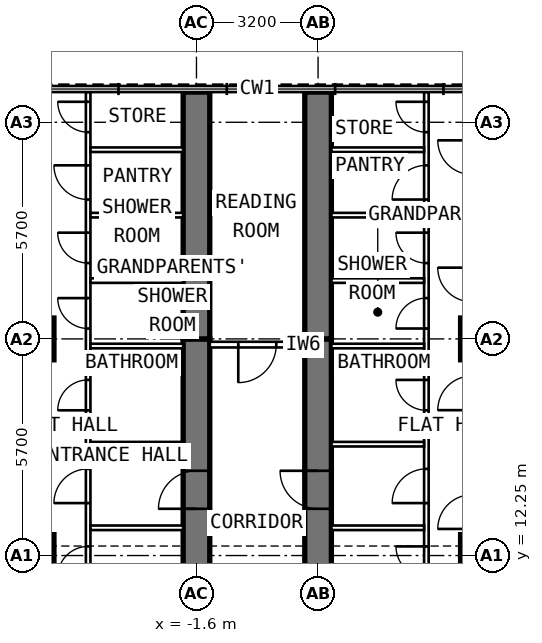
"""IFC4 building model, lengths in metres.
Left out: names, types, materials, properties, quantities, classifications, styles, units other than length and angle.
Written with IfcOpenShell. Run it as: python <this file> out.ifc"""

import sys

from ifc_helpers import new_model, si_unit, direction, frame, frame_2d, origin, origin_2d, place, context, subcontext, project, spatial, rectangle, extrude, element, fill, save


model = new_model("IFC4")
c1 = context("Model", 3, precision=1e-05, world=origin(), true_north=direction((0.0, 1.0)))
c2 = subcontext(c1, "Body", "Model", "MODEL_VIEW")
j1 = project(units=[si_unit("LENGTHUNIT", "METRE"), si_unit("PLANEANGLEUNIT", "RADIAN")], contexts=[c1])
p1 = place(None, origin())
s1 = spatial("IfcSite", under=j1, at=p1, CompositionType="ELEMENT")
p2 = place(p1, origin())
s2 = spatial("IfcBuilding", under=s1, at=p2, CompositionType="ELEMENT")
p3 = place(p2, frame((0.0, 0.0, 208.2)))
s3 = spatial("IfcBuildingStorey", under=s2, at=p3, CompositionType="ELEMENT", Elevation=208.2)
for number, where, z_axis, x_axis in (
    (1, (-5.9, 12.25, 0.0), (0.0, 0.0, 1.0), (0.0, 1.0, 0.0)),
    (2, (-5.9, 17.95, 0.0), (0.0, 0.0, 1.0), (0.0, 1.0, 0.0)),
    (3, (5.9, 12.25, 0.0), (0.0, 0.0, 1.0), (0.0, 1.0, 0.0)),
    (4, (5.9, 17.95, 0.0), (0.0, 0.0, 1.0), (0.0, 1.0, 0.0)),
):
    element("IfcColumn", number, at=place(p3, frame(where, z_axis=z_axis, x_axis=x_axis)), inside=s3, PredefinedType="COLUMN", context=c2, shape_type="SweptSolid", body=[
        extrude(rectangle(XDim=1.1, YDim=1.1, at=origin_2d()), origin(), (0.0, 0.0, 1.0), 3.6),
    ])
p4 = place(p3, frame((-1.6, 9.6, 0.0), z_axis=(0.0, 0.0, 1.0), x_axis=(0.0, 1.0, 0.0)))
e5 = element("IfcWall", 5, at=p4, inside=s3, PredefinedType="SHEAR", context=c2, shape_type="SweptSolid", body=[
    extrude(rectangle(XDim=8.35, YDim=0.7, at=frame_2d((4.175, 0.0))), origin(), (0.0, 0.0, 1.0), 3.6),
])
p5 = place(p4, frame((3.88, 0.0, 0.0)))
e6 = element("IfcOpeningElement", 6, at=p5, cuts=e5, PredefinedType="OPENING", context=c2, shape_type="SweptSolid", body=[
    extrude(rectangle(XDim=1.0, YDim=2.1, at=frame_2d((0.5, 1.05))), frame((0.0, 0.362, 0.0), z_axis=(0.0, -1.0, 0.0), x_axis=(1.0, 0.0, 0.0)), (0.0, 0.0, 1.0), 0.724),
])
p6 = place(p3, frame((-1.6, 17.95, 0.0), z_axis=(0.0, 0.0, 1.0), x_axis=(0.0, 1.0, 0.0)))
e7 = element("IfcWall", 7, at=p6, inside=s3, PredefinedType="SHEAR", context=c2, shape_type="SweptSolid", body=[
    extrude(rectangle(XDim=6.495, YDim=0.7, at=frame_2d((3.248, 0.0))), origin(), (0.0, 0.0, 1.0), 3.6),
])
p7 = place(p3, frame((1.6, 9.6, 0.0), z_axis=(0.0, 0.0, 1.0), x_axis=(0.0, 1.0, 0.0)))
e8 = element("IfcWall", 8, at=p7, inside=s3, PredefinedType="SHEAR", context=c2, shape_type="SweptSolid", body=[
    extrude(rectangle(XDim=8.35, YDim=0.7, at=frame_2d((4.175, 0.0))), origin(), (0.0, 0.0, 1.0), 3.6),
])
p8 = place(p7, frame((3.88, 0.0, 0.0)))
e9 = element("IfcOpeningElement", 9, at=p8, cuts=e8, PredefinedType="OPENING", context=c2, shape_type="SweptSolid", body=[
    extrude(rectangle(XDim=1.0, YDim=2.1, at=frame_2d((0.5, 1.05))), frame((0.0, 0.362, 0.0), z_axis=(0.0, -1.0, 0.0), x_axis=(1.0, 0.0, 0.0)), (0.0, 0.0, 1.0), 0.724),
])
p9 = place(p3, frame((1.6, 17.95, 0.0), z_axis=(0.0, 0.0, 1.0), x_axis=(0.0, 1.0, 0.0)))
e10 = element("IfcWall", 10, at=p9, inside=s3, PredefinedType="SHEAR", context=c2, shape_type="SweptSolid", body=[
    extrude(rectangle(XDim=6.495, YDim=0.7, at=frame_2d((3.248, 0.0))), origin(), (0.0, 0.0, 1.0), 3.6),
])
p10 = place(p3, frame((-4.45, 9.925, 0.0), z_axis=(0.0, 0.0, 1.0), x_axis=(0.0, 1.0, 0.0)))
e11 = element("IfcWall", 11, at=p10, inside=s3, PredefinedType="PARTITIONING", context=c2, shape_type="SweptSolid", body=[
    extrude(rectangle(XDim=14.52, YDim=0.12, at=frame_2d((7.26, 0.0))), origin(), (0.0, 0.0, 1.0), 3.35),
])
p11 = place(p10, frame((1.765, 0.0, 0.0)))
e12 = element("IfcOpeningElement", 12, at=p11, cuts=e11, PredefinedType="OPENING", context=c2, shape_type="SweptSolid", body=[
    extrude(rectangle(XDim=0.8, YDim=2.1, at=frame_2d((0.4, 1.05))), frame((0.0, 0.072, 0.0), z_axis=(0.0, -1.0, 0.0), x_axis=(1.0, 0.0, 0.0)), (0.0, 0.0, 1.0), 0.144),
])
p12 = place(p10, frame((3.705, 0.0, 0.0)))
e13 = element("IfcOpeningElement", 13, at=p12, cuts=e11, PredefinedType="OPENING", context=c2, shape_type="SweptSolid", body=[
    extrude(rectangle(XDim=0.9, YDim=2.1, at=frame_2d((0.45, 1.05))), frame((0.0, 0.072, 0.0), z_axis=(0.0, -1.0, 0.0), x_axis=(1.0, 0.0, 0.0)), (0.0, 0.0, 1.0), 0.144),
])
p13 = place(p10, frame((6.146, 0.0, 0.0)))
e14 = element("IfcOpeningElement", 14, at=p13, cuts=e11, PredefinedType="OPENING", context=c2, shape_type="SweptSolid", body=[
    extrude(rectangle(XDim=0.8, YDim=2.1, at=frame_2d((0.4, 1.05))), frame((0.0, 0.072, 0.0), z_axis=(0.0, -1.0, 0.0), x_axis=(1.0, 0.0, 0.0)), (0.0, 0.0, 1.0), 0.144),
])
p14 = place(p10, frame((8.299, 0.0, 0.0)))
e15 = element("IfcOpeningElement", 15, at=p14, cuts=e11, PredefinedType="OPENING", context=c2, shape_type="SweptSolid", body=[
    extrude(rectangle(XDim=0.8, YDim=2.1, at=frame_2d((0.4, 1.05))), frame((0.0, 0.072, 0.0), z_axis=(0.0, -1.0, 0.0), x_axis=(1.0, 0.0, 0.0)), (0.0, 0.0, 1.0), 0.144),
])
p15 = place(p10, frame((10.021, 0.0, 0.0)))
e16 = element("IfcOpeningElement", 16, at=p15, cuts=e11, PredefinedType="OPENING", context=c2, shape_type="SweptSolid", body=[
    extrude(rectangle(XDim=0.8, YDim=2.1, at=frame_2d((0.4, 1.05))), frame((0.0, 0.072, 0.0), z_axis=(0.0, -1.0, 0.0), x_axis=(1.0, 0.0, 0.0)), (0.0, 0.0, 1.0), 0.144),
])
p16 = place(p10, frame((11.692, 0.0, 0.0)))
e17 = element("IfcOpeningElement", 17, at=p16, cuts=e11, PredefinedType="OPENING", context=c2, shape_type="SweptSolid", body=[
    extrude(rectangle(XDim=0.9, YDim=2.1, at=frame_2d((0.45, 1.05))), frame((0.0, 0.072, 0.0), z_axis=(0.0, -1.0, 0.0), x_axis=(1.0, 0.0, 0.0)), (0.0, 0.0, 1.0), 0.144),
])
p17 = place(p10, frame((13.464, 0.0, 0.0)))
e18 = element("IfcOpeningElement", 18, at=p17, cuts=e11, PredefinedType="OPENING", context=c2, shape_type="SweptSolid", body=[
    extrude(rectangle(XDim=0.8, YDim=2.1, at=frame_2d((0.4, 1.05))), frame((0.0, 0.072, 0.0), z_axis=(0.0, -1.0, 0.0), x_axis=(1.0, 0.0, 0.0)), (0.0, 0.0, 1.0), 0.144),
])
for number, where, z_axis, x_axis in (
    (19, (-1.95, 12.98, 0.0), (0.0, 0.0, 1.0), (-1.0, 0.0, 0.0)),
    (20, (-1.95, 15.18, 0.0), (0.0, 0.0, 1.0), (-1.0, 0.0, 0.0)),
):
    element("IfcWall", number, at=place(p3, frame(where, z_axis=z_axis, x_axis=x_axis)), inside=s3, PredefinedType="PARTITIONING", context=c2, shape_type="SweptSolid", body=[
        extrude(rectangle(XDim=2.44, YDim=0.12, at=frame_2d((1.22, 0.0))), origin(), (0.0, 0.0, 1.0), 3.35),
    ])
p18 = place(p3, frame((-1.95, 17.763, 0.0), z_axis=(0.0, 0.0, 1.0), x_axis=(-1.0, 0.0, 0.0)))
e21 = element("IfcWall", 21, at=p18, inside=s3, PredefinedType="PARTITIONING", context=c2, shape_type="SweptSolid", body=[
    extrude(rectangle(XDim=2.44, YDim=0.12, at=frame_2d((1.22, 0.0))), origin(), (0.0, 0.0, 1.0), 2.45),
])
for number, where, z_axis, x_axis in (
    (22, (-1.95, 19.485, 0.0), (0.0, 0.0, 1.0), (-1.0, 0.0, 0.0)),
    (23, (-1.95, 21.206, 0.0), (0.0, 0.0, 1.0), (-1.0, 0.0, 0.0)),
    (24, (-1.95, 22.928, 0.0), (0.0, 0.0, 1.0), (-1.0, 0.0, 0.0)),
):
    element("IfcWall", number, at=place(p3, frame(where, z_axis=z_axis, x_axis=x_axis)), inside=s3, PredefinedType="PARTITIONING", context=c2, shape_type="SweptSolid", body=[
        extrude(rectangle(XDim=2.44, YDim=0.12, at=frame_2d((1.22, 0.0))), origin(), (0.0, 0.0, 1.0), 3.35),
    ])
p19 = place(p3, frame((4.45, 9.925, 0.0), z_axis=(0.0, 0.0, 1.0), x_axis=(0.0, 1.0, 0.0)))
e25 = element("IfcWall", 25, at=p19, inside=s3, PredefinedType="PARTITIONING", context=c2, shape_type="SweptSolid", body=[
    extrude(rectangle(XDim=14.52, YDim=0.12, at=frame_2d((7.26, 0.0))), origin(), (0.0, 0.0, 1.0), 3.35),
])
p20 = place(p19, frame((1.765, 0.0, 0.0)))
e26 = element("IfcOpeningElement", 26, at=p20, cuts=e25, PredefinedType="OPENING", context=c2, shape_type="SweptSolid", body=[
    extrude(rectangle(XDim=0.8, YDim=2.1, at=frame_2d((0.4, 1.05))), frame((0.0, 0.072, 0.0), z_axis=(0.0, -1.0, 0.0), x_axis=(1.0, 0.0, 0.0)), (0.0, 0.0, 1.0), 0.144),
])
p21 = place(p19, frame((3.705, 0.0, 0.0)))
e27 = element("IfcOpeningElement", 27, at=p21, cuts=e25, PredefinedType="OPENING", context=c2, shape_type="SweptSolid", body=[
    extrude(rectangle(XDim=0.9, YDim=2.1, at=frame_2d((0.45, 1.05))), frame((0.0, 0.072, 0.0), z_axis=(0.0, -1.0, 0.0), x_axis=(1.0, 0.0, 0.0)), (0.0, 0.0, 1.0), 0.144),
])
p22 = place(p19, frame((6.146, 0.0, 0.0)))
e28 = element("IfcOpeningElement", 28, at=p22, cuts=e25, PredefinedType="OPENING", context=c2, shape_type="SweptSolid", body=[
    extrude(rectangle(XDim=0.8, YDim=2.1, at=frame_2d((0.4, 1.05))), frame((0.0, 0.072, 0.0), z_axis=(0.0, -1.0, 0.0), x_axis=(1.0, 0.0, 0.0)), (0.0, 0.0, 1.0), 0.144),
])
p23 = place(p19, frame((8.299, 0.0, 0.0)))
e29 = element("IfcOpeningElement", 29, at=p23, cuts=e25, PredefinedType="OPENING", context=c2, shape_type="SweptSolid", body=[
    extrude(rectangle(XDim=0.8, YDim=2.1, at=frame_2d((0.4, 1.05))), frame((0.0, 0.072, 0.0), z_axis=(0.0, -1.0, 0.0), x_axis=(1.0, 0.0, 0.0)), (0.0, 0.0, 1.0), 0.144),
])
p24 = place(p19, frame((10.021, 0.0, 0.0)))
e30 = element("IfcOpeningElement", 30, at=p24, cuts=e25, PredefinedType="OPENING", context=c2, shape_type="SweptSolid", body=[
    extrude(rectangle(XDim=0.8, YDim=2.1, at=frame_2d((0.4, 1.05))), frame((0.0, 0.072, 0.0), z_axis=(0.0, -1.0, 0.0), x_axis=(1.0, 0.0, 0.0)), (0.0, 0.0, 1.0), 0.144),
])
p25 = place(p19, frame((11.692, 0.0, 0.0)))
e31 = element("IfcOpeningElement", 31, at=p25, cuts=e25, PredefinedType="OPENING", context=c2, shape_type="SweptSolid", body=[
    extrude(rectangle(XDim=0.9, YDim=2.1, at=frame_2d((0.45, 1.05))), frame((0.0, 0.072, 0.0), z_axis=(0.0, -1.0, 0.0), x_axis=(1.0, 0.0, 0.0)), (0.0, 0.0, 1.0), 0.144),
])
p26 = place(p19, frame((13.464, 0.0, 0.0)))
e32 = element("IfcOpeningElement", 32, at=p26, cuts=e25, PredefinedType="OPENING", context=c2, shape_type="SweptSolid", body=[
    extrude(rectangle(XDim=0.8, YDim=2.1, at=frame_2d((0.4, 1.05))), frame((0.0, 0.072, 0.0), z_axis=(0.0, -1.0, 0.0), x_axis=(1.0, 0.0, 0.0)), (0.0, 0.0, 1.0), 0.144),
])
for number, where, z_axis, x_axis in (
    (33, (1.95, 12.98, 0.0), (0.0, 0.0, 1.0), (1.0, 0.0, 0.0)),
    (34, (1.95, 15.18, 0.0), (0.0, 0.0, 1.0), (1.0, 0.0, 0.0)),
):
    element("IfcWall", number, at=place(p3, frame(where, z_axis=z_axis, x_axis=x_axis)), inside=s3, PredefinedType="PARTITIONING", context=c2, shape_type="SweptSolid", body=[
        extrude(rectangle(XDim=2.44, YDim=0.12, at=frame_2d((1.22, 0.0))), origin(), (0.0, 0.0, 1.0), 3.35),
    ])
p27 = place(p3, frame((1.95, 17.763, 0.0), z_axis=(0.0, 0.0, 1.0), x_axis=(1.0, 0.0, 0.0)))
e35 = element("IfcWall", 35, at=p27, inside=s3, PredefinedType="PARTITIONING", context=c2, shape_type="SweptSolid", body=[
    extrude(rectangle(XDim=2.44, YDim=0.12, at=frame_2d((1.22, 0.0))), origin(), (0.0, 0.0, 1.0), 2.45),
])
for number, where, z_axis, x_axis in (
    (36, (1.95, 19.485, 0.0), (0.0, 0.0, 1.0), (1.0, 0.0, 0.0)),
    (37, (1.95, 21.206, 0.0), (0.0, 0.0, 1.0), (1.0, 0.0, 0.0)),
    (38, (1.95, 22.928, 0.0), (0.0, 0.0, 1.0), (1.0, 0.0, 0.0)),
):
    element("IfcWall", number, at=place(p3, frame(where, z_axis=z_axis, x_axis=x_axis)), inside=s3, PredefinedType="PARTITIONING", context=c2, shape_type="SweptSolid", body=[
        extrude(rectangle(XDim=2.44, YDim=0.12, at=frame_2d((1.22, 0.0))), origin(), (0.0, 0.0, 1.0), 3.35),
    ])
p28 = place(p3, frame((1.25, 17.8, 0.0), z_axis=(0.0, 0.0, 1.0), x_axis=(-1.0, 0.0, 0.0)))
e39 = element("IfcWall", 39, at=p28, inside=s3, PredefinedType="PARTITIONING", context=c2, shape_type="SweptSolid", body=[
    extrude(rectangle(XDim=2.5, YDim=0.15, at=frame_2d((1.25, 0.0))), origin(), (0.0, 0.0, 1.0), 3.35),
])
p29 = place(p28, frame((0.75, 0.0, 0.0)))
e40 = element("IfcOpeningElement", 40, at=p29, cuts=e39, PredefinedType="OPENING", context=c2, shape_type="SweptSolid", body=[
    extrude(rectangle(XDim=1.0, YDim=2.1, at=frame_2d((0.5, 1.05))), frame((0.0, 0.087, 0.0), z_axis=(0.0, -1.0, 0.0), x_axis=(1.0, 0.0, 0.0)), (0.0, 0.0, 1.0), 0.174),
])
p30 = place(p5, origin())
e41 = element("IfcDoor", 41, at=p30, inside=s3, OperationType="SINGLE_SWING_LEFT", PredefinedType="DOOR", context=c2, shape_type="SweptSolid", body=[
    extrude(rectangle(XDim=1.0, YDim=2.1, at=frame_2d((0.5, 1.05))), frame((0.0, 0.1, 0.0), z_axis=(0.0, -1.0, 0.0), x_axis=(1.0, 0.0, 0.0)), (0.0, 0.0, 1.0), 0.2),
])
fill(e6, e41)
p31 = place(p11, origin())
e42 = element("IfcDoor", 42, at=p31, inside=s3, OperationType="SINGLE_SWING_LEFT", PredefinedType="DOOR", context=c2, shape_type="SweptSolid", body=[
    extrude(rectangle(XDim=0.8, YDim=2.1, at=frame_2d((0.4, 1.05))), frame((0.0, 0.025, 0.0), z_axis=(0.0, -1.0, 0.0), x_axis=(1.0, 0.0, 0.0)), (0.0, 0.0, 1.0), 0.05),
])
fill(e12, e42)
p32 = place(p12, origin())
e43 = element("IfcDoor", 43, at=p32, inside=s3, OperationType="SINGLE_SWING_LEFT", PredefinedType="DOOR", context=c2, shape_type="SweptSolid", body=[
    extrude(rectangle(XDim=0.9, YDim=2.1, at=frame_2d((0.45, 1.05))), frame((0.0, 0.025, 0.0), z_axis=(0.0, -1.0, 0.0), x_axis=(1.0, 0.0, 0.0)), (0.0, 0.0, 1.0), 0.05),
])
fill(e13, e43)
p33 = place(p13, origin())
e44 = element("IfcDoor", 44, at=p33, inside=s3, OperationType="SINGLE_SWING_LEFT", PredefinedType="DOOR", context=c2, shape_type="SweptSolid", body=[
    extrude(rectangle(XDim=0.8, YDim=2.1, at=frame_2d((0.4, 1.05))), frame((0.0, 0.025, 0.0), z_axis=(0.0, -1.0, 0.0), x_axis=(1.0, 0.0, 0.0)), (0.0, 0.0, 1.0), 0.05),
])
fill(e14, e44)
p34 = place(p14, origin())
e45 = element("IfcDoor", 45, at=p34, inside=s3, OperationType="SINGLE_SWING_RIGHT", PredefinedType="DOOR", context=c2, shape_type="SweptSolid", body=[
    extrude(rectangle(XDim=0.8, YDim=2.1, at=frame_2d((0.4, 1.05))), frame((0.0, 0.025, 0.0), z_axis=(0.0, -1.0, 0.0), x_axis=(1.0, 0.0, 0.0)), (0.0, 0.0, 1.0), 0.05),
])
fill(e15, e45)
p35 = place(p15, origin())
e46 = element("IfcDoor", 46, at=p35, inside=s3, OperationType="SINGLE_SWING_RIGHT", PredefinedType="DOOR", context=c2, shape_type="SweptSolid", body=[
    extrude(rectangle(XDim=0.8, YDim=2.1, at=frame_2d((0.4, 1.05))), frame((0.0, 0.025, 0.0), z_axis=(0.0, -1.0, 0.0), x_axis=(1.0, 0.0, 0.0)), (0.0, 0.0, 1.0), 0.05),
])
fill(e16, e46)
p36 = place(p16, origin())
e47 = element("IfcDoor", 47, at=p36, inside=s3, OperationType="SINGLE_SWING_RIGHT", PredefinedType="DOOR", context=c2, shape_type="SweptSolid", body=[
    extrude(rectangle(XDim=0.9, YDim=2.1, at=frame_2d((0.45, 1.05))), frame((0.0, 0.025, 0.0), z_axis=(0.0, -1.0, 0.0), x_axis=(1.0, 0.0, 0.0)), (0.0, 0.0, 1.0), 0.05),
])
fill(e17, e47)
p37 = place(p17, origin())
e48 = element("IfcDoor", 48, at=p37, inside=s3, OperationType="SINGLE_SWING_RIGHT", PredefinedType="DOOR", context=c2, shape_type="SweptSolid", body=[
    extrude(rectangle(XDim=0.8, YDim=2.1, at=frame_2d((0.4, 1.05))), frame((0.0, 0.025, 0.0), z_axis=(0.0, -1.0, 0.0), x_axis=(1.0, 0.0, 0.0)), (0.0, 0.0, 1.0), 0.05),
])
fill(e18, e48)
p38 = place(p8, origin())
e49 = element("IfcDoor", 49, at=p38, inside=s3, OperationType="SINGLE_SWING_RIGHT", PredefinedType="DOOR", context=c2, shape_type="SweptSolid", body=[
    extrude(rectangle(XDim=1.0, YDim=2.1, at=frame_2d((0.5, 1.05))), frame((0.0, 0.1, 0.0), z_axis=(0.0, -1.0, 0.0), x_axis=(1.0, 0.0, 0.0)), (0.0, 0.0, 1.0), 0.2),
])
fill(e9, e49)
p39 = place(p20, origin())
e50 = element("IfcDoor", 50, at=p39, inside=s3, OperationType="SINGLE_SWING_RIGHT", PredefinedType="DOOR", context=c2, shape_type="SweptSolid", body=[
    extrude(rectangle(XDim=0.8, YDim=2.1, at=frame_2d((0.4, 1.05))), frame((0.0, 0.025, 0.0), z_axis=(0.0, -1.0, 0.0), x_axis=(1.0, 0.0, 0.0)), (0.0, 0.0, 1.0), 0.05),
])
fill(e26, e50)
p40 = place(p21, origin())
e51 = element("IfcDoor", 51, at=p40, inside=s3, OperationType="SINGLE_SWING_LEFT", PredefinedType="DOOR", context=c2, shape_type="SweptSolid", body=[
    extrude(rectangle(XDim=0.9, YDim=2.1, at=frame_2d((0.45, 1.05))), frame((0.0, 0.025, 0.0), z_axis=(0.0, -1.0, 0.0), x_axis=(1.0, 0.0, 0.0)), (0.0, 0.0, 1.0), 0.05),
])
fill(e27, e51)
p41 = place(p22, origin())
e52 = element("IfcDoor", 52, at=p41, inside=s3, OperationType="SINGLE_SWING_RIGHT", PredefinedType="DOOR", context=c2, shape_type="SweptSolid", body=[
    extrude(rectangle(XDim=0.8, YDim=2.1, at=frame_2d((0.4, 1.05))), frame((0.0, 0.025, 0.0), z_axis=(0.0, -1.0, 0.0), x_axis=(1.0, 0.0, 0.0)), (0.0, 0.0, 1.0), 0.05),
])
fill(e28, e52)
p42 = place(p23, origin())
e53 = element("IfcDoor", 53, at=p42, inside=s3, OperationType="SINGLE_SWING_LEFT", PredefinedType="DOOR", context=c2, shape_type="SweptSolid", body=[
    extrude(rectangle(XDim=0.8, YDim=2.1, at=frame_2d((0.4, 1.05))), frame((0.0, 0.025, 0.0), z_axis=(0.0, -1.0, 0.0), x_axis=(1.0, 0.0, 0.0)), (0.0, 0.0, 1.0), 0.05),
])
fill(e29, e53)
p43 = place(p24, origin())
e54 = element("IfcDoor", 54, at=p43, inside=s3, OperationType="SINGLE_SWING_RIGHT", PredefinedType="DOOR", context=c2, shape_type="SweptSolid", body=[
    extrude(rectangle(XDim=0.8, YDim=2.1, at=frame_2d((0.4, 1.05))), frame((0.0, 0.025, 0.0), z_axis=(0.0, -1.0, 0.0), x_axis=(1.0, 0.0, 0.0)), (0.0, 0.0, 1.0), 0.05),
])
fill(e30, e54)
p44 = place(p25, origin())
e55 = element("IfcDoor", 55, at=p44, inside=s3, OperationType="SINGLE_SWING_LEFT", PredefinedType="DOOR", context=c2, shape_type="SweptSolid", body=[
    extrude(rectangle(XDim=0.9, YDim=2.1, at=frame_2d((0.45, 1.05))), frame((0.0, 0.025, 0.0), z_axis=(0.0, -1.0, 0.0), x_axis=(1.0, 0.0, 0.0)), (0.0, 0.0, 1.0), 0.05),
])
fill(e31, e55)
p45 = place(p26, origin())
e56 = element("IfcDoor", 56, at=p45, inside=s3, OperationType="SINGLE_SWING_RIGHT", PredefinedType="DOOR", context=c2, shape_type="SweptSolid", body=[
    extrude(rectangle(XDim=0.8, YDim=2.1, at=frame_2d((0.4, 1.05))), frame((0.0, 0.025, 0.0), z_axis=(0.0, -1.0, 0.0), x_axis=(1.0, 0.0, 0.0)), (0.0, 0.0, 1.0), 0.05),
])
fill(e32, e56)
p46 = place(p29, origin())
e57 = element("IfcDoor", 57, at=p46, inside=s3, OperationType="SINGLE_SWING_RIGHT", PredefinedType="DOOR", context=c2, shape_type="SweptSolid", body=[
    extrude(rectangle(XDim=1.0, YDim=2.1, at=frame_2d((0.5, 1.05))), frame((0.0, 0.025, 0.0), z_axis=(0.0, -1.0, 0.0), x_axis=(1.0, 0.0, 0.0)), (0.0, 0.0, 1.0), 0.05),
])
fill(e40, e57)
save(model, sys.argv[1])
